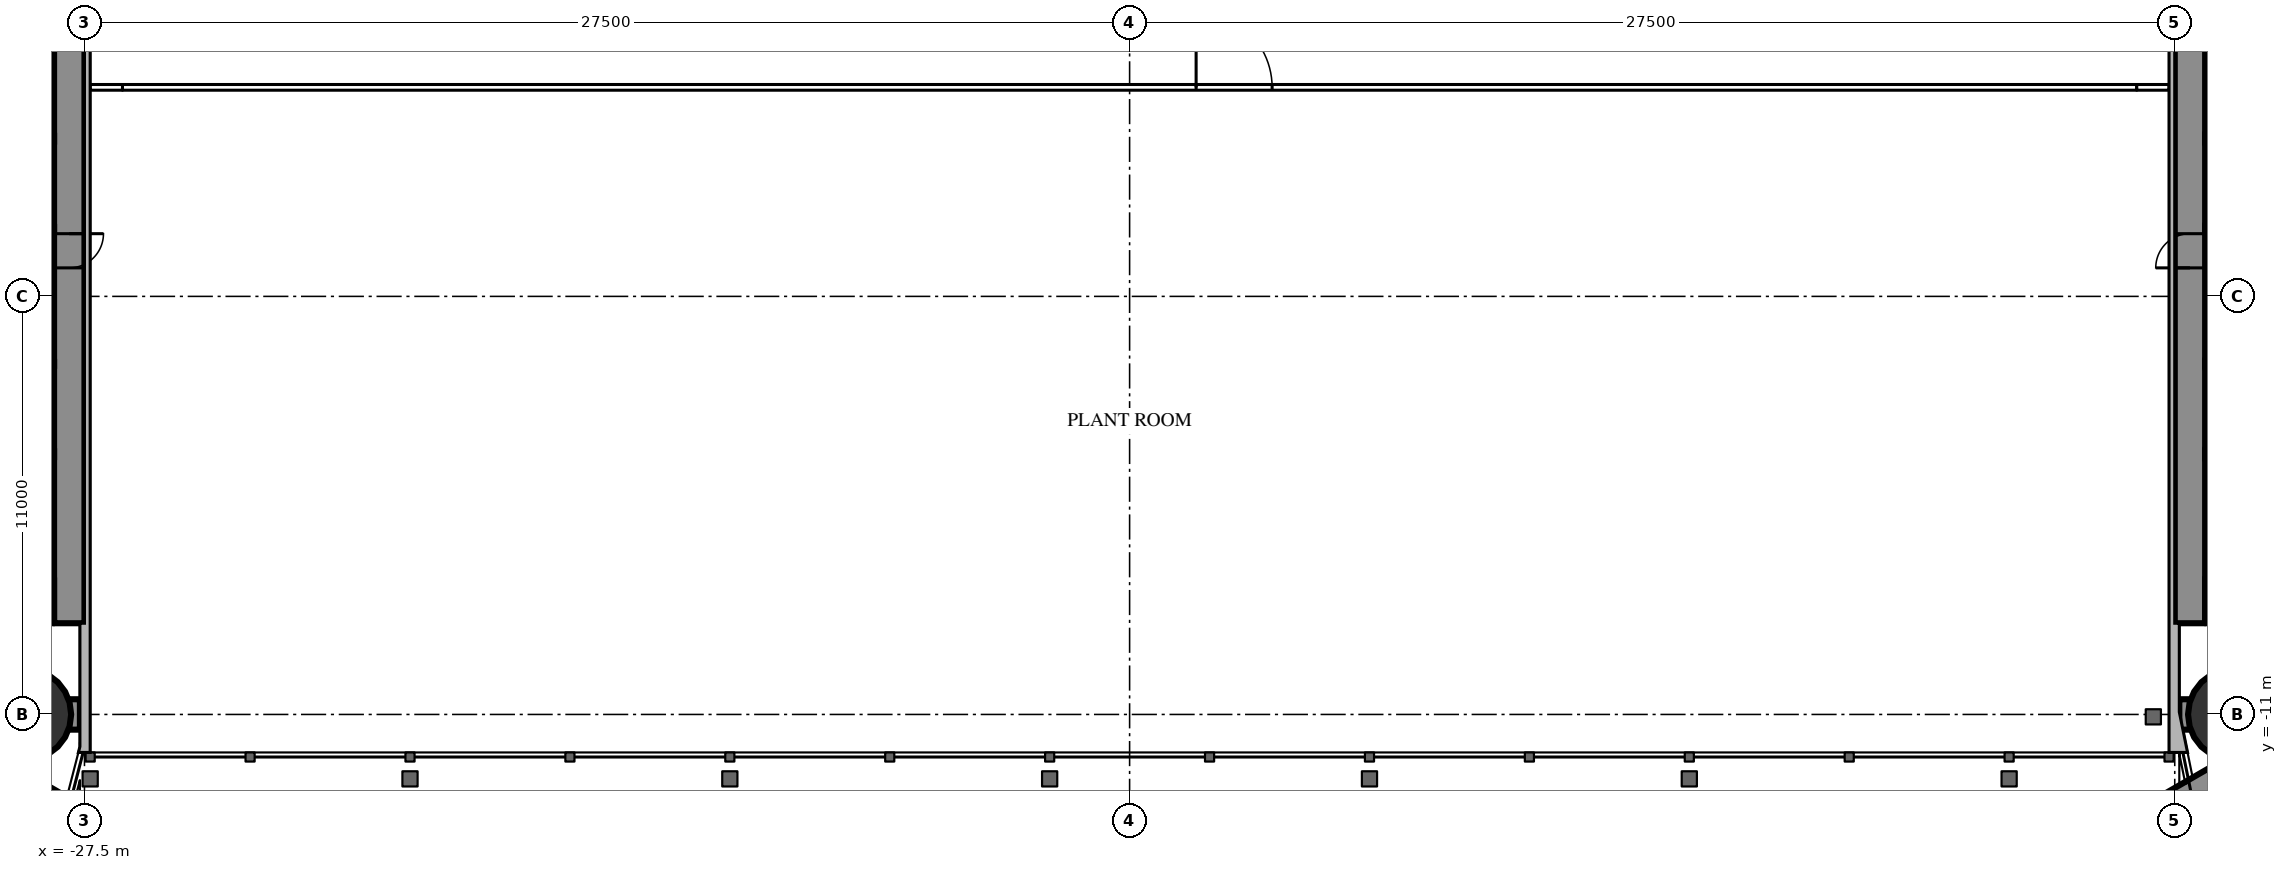
"""IFC4 building model, lengths in metres.
Left out: names, types, materials, properties, quantities, classifications, styles, units other than length and angle.
Written with IfcOpenShell. Run it as: python <this file> out.ifc"""

import sys

from ifc_helpers import new_model, si_unit, direction, frame, frame_2d, origin, origin_2d, place, context, subcontext, project, spatial, rectangle, hollow_circle, extrude, element, fill, save


model = new_model("IFC4")
c1 = context("Model", 3, precision=1e-05, world=origin(), true_north=direction((0.0, 1.0)))
c2 = subcontext(c1, "Body", "Model", "MODEL_VIEW")
j1 = project(units=[si_unit("LENGTHUNIT", "METRE"), si_unit("PLANEANGLEUNIT", "RADIAN")], contexts=[c1])
p1 = place(None, origin())
s1 = spatial("IfcSite", under=j1, at=p1, CompositionType="ELEMENT")
p2 = place(p1, origin())
s2 = spatial("IfcBuilding", under=s1, at=p2, CompositionType="ELEMENT")
p3 = place(p2, frame((0.0, 0.0, 210.3)))
s3 = spatial("IfcBuildingStorey", under=s2, at=p3, CompositionType="ELEMENT", Elevation=210.3)
p4 = place(p3, frame((-29.05, -11.0, 0.0), z_axis=(0.0, 0.0, 1.0), x_axis=(1.0, 0.0, 0.0)))
e1 = element("IfcColumn", 1, at=p4, inside=s3, PredefinedType="COLUMN", context=c2, shape_type="SweptSolid", body=[
    extrude(hollow_circle(Radius=1.2, WallThickness=0.09, at=origin_2d()), origin(), (0.0, 0.0, 1.0), 5.0),
])
p5 = place(p3, frame((-27.9, 8.6, 0.0), z_axis=(0.0, 0.0, 1.0), x_axis=(0.0, -1.0, 0.0)))
e2 = element("IfcWall", 2, at=p5, inside=s3, PredefinedType="SHEAR", context=c2, shape_type="SweptSolid", body=[
    extrude(rectangle(XDim=17.2, YDim=0.8, at=frame_2d((8.6, 0.0))), origin(), (0.0, 0.0, 1.0), 5.0),
])
p6 = place(p5, frame((6.95, 0.0, 0.0)))
e3 = element("IfcOpeningElement", 3, at=p6, cuts=e2, PredefinedType="OPENING", context=c2, shape_type="SweptSolid", body=[
    extrude(rectangle(XDim=0.9, YDim=2.2, at=frame_2d((0.45, 1.1))), frame((0.0, 0.41, 0.0), z_axis=(0.0, -1.0, 0.0), x_axis=(1.0, 0.0, 0.0)), (0.0, 0.0, 1.0), 0.82),
])
p7 = place(p3, frame((-28.3, -8.0, 0.0), z_axis=(0.0, 0.0, 1.0), x_axis=(-1.0, 0.0, 0.0)))
e4 = element("IfcWall", 4, at=p7, inside=s3, PredefinedType="SHEAR", context=c2, shape_type="SweptSolid", body=[
    extrude(rectangle(XDim=8.4, YDim=1.2, at=frame_2d((4.2, 0.0))), origin(), (0.0, 0.0, 1.0), 5.0),
])
p8 = place(p7, frame((0.25, 0.0, 0.0)))
e5 = element("IfcOpeningElement", 5, at=p8, cuts=e4, PredefinedType="OPENING", context=c2, shape_type="SweptSolid", body=[
    extrude(rectangle(XDim=1.0, YDim=2.2, at=frame_2d((0.5, 1.1))), frame((0.0, 0.61, 0.0), z_axis=(0.0, -1.0, 0.0), x_axis=(1.0, 0.0, 0.0)), (0.0, 0.0, 1.0), 1.22),
])
for number, where, z_axis, x_axis in (
    (6, (-28.3, 4.15, 0.0), (0.0, 0.0, 1.0), (-1.0, 0.0, 0.0)),
    (7, (-28.3, -4.15, 0.0), (0.0, 0.0, 1.0), (-1.0, 0.0, 0.0)),
):
    element("IfcWall", number, at=place(p3, frame(where, z_axis=z_axis, x_axis=x_axis)), inside=s3, PredefinedType="SHEAR", context=c2, shape_type="SweptSolid", body=[
        extrude(rectangle(XDim=8.4, YDim=0.3, at=frame_2d((4.2, 0.0))), origin(), (0.0, 0.0, 1.0), 5.0),
    ])
for number, where, z_axis, x_axis in (
    (8, (-28.3, 1.775, 0.0), (0.0, 0.0, 1.0), (-1.0, 0.0, 0.0)),
    (9, (-28.3, -1.775, 0.0), (0.0, 0.0, 1.0), (-1.0, 0.0, 0.0)),
):
    element("IfcWall", number, at=place(p3, frame(where, z_axis=z_axis, x_axis=x_axis)), inside=s3, PredefinedType="SHEAR", context=c2, shape_type="SweptSolid", body=[
        extrude(rectangle(XDim=2.9, YDim=0.25, at=frame_2d((1.45, 0.0))), origin(), (0.0, 0.0, 1.0), 5.0),
    ])
p9 = place(p3, frame((-27.2, 14.3, 0.0), z_axis=(0.0, 0.0, 1.0), x_axis=(-0.866026593062, -0.499997940104, 0.0)))
e10 = element("IfcWall", 10, at=p9, inside=s3, PredefinedType="SHEAR", context=c2, shape_type="SweptSolid", body=[
    extrude(rectangle(XDim=28.946, YDim=1.2, at=frame_2d((14.473, 0.0))), origin(), (0.0, 0.0, 1.0), 5.0),
])
p10 = place(p9, frame((6.5, 0.0, 0.0)))
e11 = element("IfcOpeningElement", 11, at=p10, cuts=e10, PredefinedType="OPENING", context=c2, shape_type="SweptSolid", body=[
    extrude(rectangle(XDim=1.0, YDim=2.2, at=frame_2d((0.5, 1.1))), frame((0.0, 0.61, 0.0), z_axis=(0.0, -1.0, 0.0), x_axis=(1.0, 0.0, 0.0)), (0.0, 0.0, 1.0), 1.22),
])
p11 = place(p9, frame((13.568, 0.0, 0.0)))
e12 = element("IfcOpeningElement", 12, at=p11, cuts=e10, PredefinedType="OPENING", context=c2, shape_type="SweptSolid", body=[
    extrude(rectangle(XDim=1.8, YDim=2.2, at=frame_2d((0.9, 1.1))), frame((0.0, 0.61, 0.0), z_axis=(0.0, -1.0, 0.0), x_axis=(1.0, 0.0, 0.0)), (0.0, 0.0, 1.0), 1.22),
])
p12 = place(p3, frame((-27.2, -14.3, 0.0), z_axis=(0.0, 0.0, 1.0), x_axis=(-0.866024021859, 0.500002393557, 0.0)))
e13 = element("IfcWall", 13, at=p12, inside=s3, PredefinedType="SHEAR", context=c2, shape_type="SweptSolid", body=[
    extrude(rectangle(XDim=27.907, YDim=1.2, at=frame_2d((13.954, 0.0))), origin(), (0.0, 0.0, 1.0), 5.0),
])
p13 = place(p12, frame((6.5, 0.0, 0.0)))
e14 = element("IfcOpeningElement", 14, at=p13, cuts=e13, PredefinedType="OPENING", context=c2, shape_type="SweptSolid", body=[
    extrude(rectangle(XDim=1.0, YDim=2.2, at=frame_2d((0.5, 1.1))), frame((0.0, 0.61, 0.0), z_axis=(0.0, -1.0, 0.0), x_axis=(1.0, 0.0, 0.0)), (0.0, 0.0, 1.0), 1.22),
])
p14 = place(p12, frame((13.568, 0.0, 0.0)))
e15 = element("IfcOpeningElement", 15, at=p14, cuts=e13, PredefinedType="OPENING", context=c2, shape_type="SweptSolid", body=[
    extrude(rectangle(XDim=1.8, YDim=2.2, at=frame_2d((0.9, 1.1))), frame((0.0, 0.61, 0.0), z_axis=(0.0, -1.0, 0.0), x_axis=(1.0, 0.0, 0.0)), (0.0, 0.0, 1.0), 1.22),
])
p15 = place(p3, frame((-27.62, -11.0, 0.0), z_axis=(0.0, 0.0, 1.0), x_axis=(-1.0, 0.0, 0.0)))
e16 = element("IfcWall", 16, at=p15, inside=s3, PredefinedType="SHEAR", context=c2, shape_type="SweptSolid", body=[
    extrude(rectangle(XDim=4.076, YDim=0.8, at=frame_2d((2.038, 0.0))), origin(), (0.0, 0.0, 1.0), 5.0),
])
p16 = place(p3, frame((29.05, -11.0, 0.0), z_axis=(0.0, 0.0, 1.0), x_axis=(1.0, 0.0, 0.0)))
e17 = element("IfcColumn", 17, at=p16, inside=s3, PredefinedType="COLUMN", context=c2, shape_type="SweptSolid", body=[
    extrude(hollow_circle(Radius=1.2, WallThickness=0.09, at=origin_2d()), origin(), (0.0, 0.0, 1.0), 5.0),
])
p17 = place(p3, frame((27.9, -8.6, 0.0), z_axis=(0.0, 0.0, 1.0), x_axis=(0.0, 1.0, 0.0)))
e18 = element("IfcWall", 18, at=p17, inside=s3, PredefinedType="SHEAR", context=c2, shape_type="SweptSolid", body=[
    extrude(rectangle(XDim=17.2, YDim=0.8, at=frame_2d((8.6, 0.0))), origin(), (0.0, 0.0, 1.0), 5.0),
])
p18 = place(p17, frame((9.35, 0.0, 0.0)))
e19 = element("IfcOpeningElement", 19, at=p18, cuts=e18, PredefinedType="OPENING", context=c2, shape_type="SweptSolid", body=[
    extrude(rectangle(XDim=0.9, YDim=2.2, at=frame_2d((0.45, 1.1))), frame((0.0, 0.41, 0.0), z_axis=(0.0, -1.0, 0.0), x_axis=(1.0, 0.0, 0.0)), (0.0, 0.0, 1.0), 0.82),
])
p19 = place(p3, frame((28.3, -8.0, 0.0), z_axis=(0.0, 0.0, 1.0), x_axis=(1.0, 0.0, 0.0)))
e20 = element("IfcWall", 20, at=p19, inside=s3, PredefinedType="SHEAR", context=c2, shape_type="SweptSolid", body=[
    extrude(rectangle(XDim=8.4, YDim=1.2, at=frame_2d((4.2, 0.0))), origin(), (0.0, 0.0, 1.0), 5.0),
])
p20 = place(p19, frame((0.25, 0.0, 0.0)))
e21 = element("IfcOpeningElement", 21, at=p20, cuts=e20, PredefinedType="OPENING", context=c2, shape_type="SweptSolid", body=[
    extrude(rectangle(XDim=1.0, YDim=2.2, at=frame_2d((0.5, 1.1))), frame((0.0, 0.61, 0.0), z_axis=(0.0, -1.0, 0.0), x_axis=(1.0, 0.0, 0.0)), (0.0, 0.0, 1.0), 1.22),
])
for number, where, z_axis, x_axis in (
    (22, (28.3, -4.15, 0.0), (0.0, 0.0, 1.0), (1.0, 0.0, 0.0)),
    (23, (28.3, 4.15, 0.0), (0.0, 0.0, 1.0), (1.0, 0.0, 0.0)),
):
    element("IfcWall", number, at=place(p3, frame(where, z_axis=z_axis, x_axis=x_axis)), inside=s3, PredefinedType="SHEAR", context=c2, shape_type="SweptSolid", body=[
        extrude(rectangle(XDim=8.4, YDim=0.3, at=frame_2d((4.2, 0.0))), origin(), (0.0, 0.0, 1.0), 5.0),
    ])
for number, where, z_axis, x_axis in (
    (24, (28.3, -1.775, 0.0), (0.0, 0.0, 1.0), (1.0, 0.0, 0.0)),
    (25, (28.3, 1.775, 0.0), (0.0, 0.0, 1.0), (1.0, 0.0, 0.0)),
):
    element("IfcWall", number, at=place(p3, frame(where, z_axis=z_axis, x_axis=x_axis)), inside=s3, PredefinedType="SHEAR", context=c2, shape_type="SweptSolid", body=[
        extrude(rectangle(XDim=2.9, YDim=0.25, at=frame_2d((1.45, 0.0))), origin(), (0.0, 0.0, 1.0), 5.0),
    ])
p21 = place(p3, frame((27.2, -13.8, 0.0), z_axis=(0.0, 0.0, 1.0), x_axis=(0.866027159892, 0.499996958321, 0.0)))
e26 = element("IfcWall", 26, at=p21, inside=s3, PredefinedType="SHEAR", context=c2, shape_type="SweptSolid", body=[
    extrude(rectangle(XDim=27.947, YDim=1.2, at=frame_2d((13.973, 0.0))), origin(), (0.0, 0.0, 1.0), 5.0),
])
p22 = place(p21, frame((6.5, 0.0, 0.0)))
e27 = element("IfcOpeningElement", 27, at=p22, cuts=e26, PredefinedType="OPENING", context=c2, shape_type="SweptSolid", body=[
    extrude(rectangle(XDim=1.0, YDim=2.2, at=frame_2d((0.5, 1.1))), frame((0.0, 0.61, 0.0), z_axis=(0.0, -1.0, 0.0), x_axis=(1.0, 0.0, 0.0)), (0.0, 0.0, 1.0), 1.22),
])
p23 = place(p21, frame((13.568, 0.0, 0.0)))
e28 = element("IfcOpeningElement", 28, at=p23, cuts=e26, PredefinedType="OPENING", context=c2, shape_type="SweptSolid", body=[
    extrude(rectangle(XDim=1.8, YDim=2.2, at=frame_2d((0.9, 1.1))), frame((0.0, 0.61, 0.0), z_axis=(0.0, -1.0, 0.0), x_axis=(1.0, 0.0, 0.0)), (0.0, 0.0, 1.0), 1.22),
])
p24 = place(p3, frame((27.2, 13.8, 0.0), z_axis=(0.0, 0.0, 1.0), x_axis=(0.866024515034, -0.500001539357, 0.0)))
e29 = element("IfcWall", 29, at=p24, inside=s3, PredefinedType="SHEAR", context=c2, shape_type="SweptSolid", body=[
    extrude(rectangle(XDim=26.907, YDim=1.2, at=frame_2d((13.454, 0.0))), origin(), (0.0, 0.0, 1.0), 5.0),
])
p25 = place(p24, frame((6.5, 0.0, 0.0)))
e30 = element("IfcOpeningElement", 30, at=p25, cuts=e29, PredefinedType="OPENING", context=c2, shape_type="SweptSolid", body=[
    extrude(rectangle(XDim=1.0, YDim=2.2, at=frame_2d((0.5, 1.1))), frame((0.0, 0.61, 0.0), z_axis=(0.0, -1.0, 0.0), x_axis=(1.0, 0.0, 0.0)), (0.0, 0.0, 1.0), 1.22),
])
p26 = place(p24, frame((13.568, 0.0, 0.0)))
e31 = element("IfcOpeningElement", 31, at=p26, cuts=e29, PredefinedType="OPENING", context=c2, shape_type="SweptSolid", body=[
    extrude(rectangle(XDim=1.8, YDim=2.2, at=frame_2d((0.9, 1.1))), frame((0.0, 0.61, 0.0), z_axis=(0.0, -1.0, 0.0), x_axis=(1.0, 0.0, 0.0)), (0.0, 0.0, 1.0), 1.22),
])
p27 = place(p3, frame((27.62, -11.0, 0.0), z_axis=(0.0, 0.0, 1.0), x_axis=(1.0, 0.0, 0.0)))
e32 = element("IfcWall", 32, at=p27, inside=s3, PredefinedType="SHEAR", context=c2, shape_type="SweptSolid", body=[
    extrude(rectangle(XDim=3.209, YDim=0.8, at=frame_2d((1.605, 0.0))), origin(), (0.0, 0.0, 1.0), 5.0),
])
p28 = place(p3, frame((-26.5, 5.5, 0.0), z_axis=(0.0, 0.0, 1.0), x_axis=(1.0, 0.0, 0.0)))
e33 = element("IfcWall", 33, at=p28, inside=s3, PredefinedType="PARTITIONING", context=c2, shape_type="SweptSolid", body=[
    extrude(rectangle(XDim=53.0, YDim=0.15, at=frame_2d((26.5, 0.0))), origin(), (0.0, 0.0, 1.0), 4.03),
])
p29 = place(p28, frame((28.25, 0.0, 0.0)))
e34 = element("IfcOpeningElement", 34, at=p29, cuts=e33, PredefinedType="OPENING", context=c2, shape_type="SweptSolid", body=[
    extrude(rectangle(XDim=2.0, YDim=2.4, at=frame_2d((1.0, 1.2))), frame((0.0, 0.085, 0.0), z_axis=(0.0, -1.0, 0.0), x_axis=(1.0, 0.0, 0.0)), (0.0, 0.0, 1.0), 0.17),
])
for number, where, z_axis, x_axis in (
    (35, (-27.35, 5.5, 0.0), (0.0, 0.0, 1.0), (1.0, 0.0, 0.0)),
    (36, (26.5, 5.5, 0.0), (0.0, 0.0, 1.0), (1.0, 0.0, 0.0)),
):
    element("IfcWall", number, at=place(p3, frame(where, z_axis=z_axis, x_axis=x_axis)), inside=s3, PredefinedType="PARTITIONING", context=c2, shape_type="SweptSolid", body=[
        extrude(rectangle(XDim=0.85, YDim=0.15, at=frame_2d((0.425, 0.0))), origin(), (0.0, 0.0, 1.0), 3.8),
    ])
p30 = place(p6, origin())
e37 = element("IfcDoor", 37, at=p30, inside=s3, OperationType="SINGLE_SWING_LEFT", PredefinedType="DOOR", context=c2, shape_type="SweptSolid", body=[
    extrude(rectangle(XDim=0.9, YDim=2.2, at=frame_2d((0.45, 1.1))), frame((0.0, 0.025, 0.0), z_axis=(0.0, -1.0, 0.0), x_axis=(1.0, 0.0, 0.0)), (0.0, 0.0, 1.0), 0.05),
])
fill(e3, e37)
p31 = place(p18, origin())
e38 = element("IfcDoor", 38, at=p31, inside=s3, OperationType="SINGLE_SWING_LEFT", PredefinedType="DOOR", context=c2, shape_type="SweptSolid", body=[
    extrude(rectangle(XDim=0.9, YDim=2.2, at=frame_2d((0.45, 1.1))), frame((0.0, 0.025, 0.0), z_axis=(0.0, -1.0, 0.0), x_axis=(1.0, 0.0, 0.0)), (0.0, 0.0, 1.0), 0.05),
])
fill(e19, e38)
p32 = place(p29, origin())
e39 = element("IfcDoor", 39, at=p32, inside=s3, OperationType="DOUBLE_DOOR_SINGLE_SWING", PredefinedType="DOOR", context=c2, shape_type="SweptSolid", body=[
    extrude(rectangle(XDim=2.0, YDim=2.4, at=frame_2d((1.0, 1.2))), frame((0.0, 0.025, 0.0), z_axis=(0.0, -1.0, 0.0), x_axis=(1.0, 0.0, 0.0)), (0.0, 0.0, 1.0), 0.05),
])
fill(e34, e39)
save(model, sys.argv[1])
